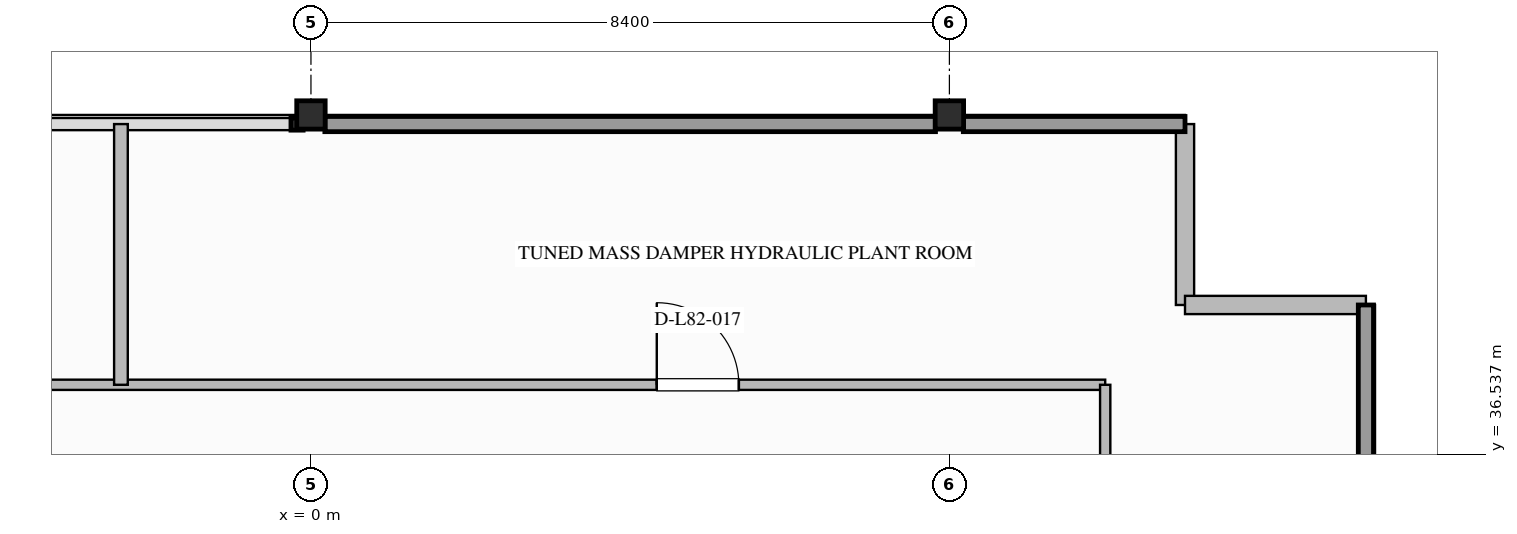
"""IFC4 building model, lengths in metres.
Left out: names, types, materials, properties, quantities, classifications, styles, units other than length and angle.
Written with IfcOpenShell. Run it as: python <this file> out.ifc"""

import sys

from ifc_helpers import new_model, si_unit, direction, frame, frame_2d, origin, origin_2d, place, context, subcontext, project, spatial, rectangle, i_section, extrude, element, fill, save


model = new_model("IFC4")
c1 = context("Model", 3, precision=1e-05, world=origin(), true_north=direction((0.0, 1.0)))
c2 = subcontext(c1, "Body", "Model", "MODEL_VIEW")
j1 = project(units=[si_unit("LENGTHUNIT", "METRE"), si_unit("PLANEANGLEUNIT", "RADIAN")], contexts=[c1])
p1 = place(None, origin())
s1 = spatial("IfcSite", under=j1, at=p1, CompositionType="ELEMENT")
p2 = place(p1, origin())
s2 = spatial("IfcBuilding", under=s1, at=p2, CompositionType="ELEMENT")
p3 = place(p2, frame((0.0, 0.0, 315.4)))
s3 = spatial("IfcBuildingStorey", under=s2, at=p3, CompositionType="ELEMENT", Elevation=315.4)
for number, where, z_axis, x_axis in (
    (1, (0.0, 41.0, 0.0), (0.0, 0.0, 1.0), (1.0, 0.0, 0.0)),
    (2, (8.4, 41.0, 0.0), (0.0, 0.0, 1.0), (1.0, 0.0, 0.0)),
):
    element("IfcColumn", number, at=place(p3, frame(where, z_axis=z_axis, x_axis=x_axis)), inside=s3, PredefinedType="COLUMN", context=c2, shape_type="SweptSolid", body=[
        extrude(i_section(OverallWidth=0.374, OverallDepth=0.372, WebThickness=0.016, FlangeThickness=0.026, FilletRadius=0.025, at=origin_2d()), origin(), (0.0, 0.0, 1.0), 3.997),
    ])
for number, where, z_axis, x_axis in (
    (3, (11.5, 40.88, 0.0), (0.0, 0.0, 1.0), (0.0, -1.0, 0.0)),
    (4, (11.5, 38.5, 0.0), (0.0, 0.0, 1.0), (1.0, 0.0, 0.0)),
):
    element("IfcWall", number, at=place(p3, frame(where, z_axis=z_axis, x_axis=x_axis)), inside=s3, PredefinedType="STANDARD", context=c2, shape_type="SweptSolid", body=[
        extrude(rectangle(XDim=2.38, YDim=0.24, at=frame_2d((1.19, 0.0))), origin(), (0.0, 0.0, 1.0), 3.68),
    ])
p4 = place(p3, frame((-10.45, 37.45, 0.0), z_axis=(0.0, 0.0, 1.0), x_axis=(1.0, 0.0, 0.0)))
e5 = element("IfcWall", 5, at=p4, inside=s3, PredefinedType="PARTITIONING", context=c2, shape_type="SweptSolid", body=[
    extrude(rectangle(XDim=20.9, YDim=0.135, at=frame_2d((10.45, 0.0))), origin(), (0.0, 0.0, 1.0), 3.68),
])
p5 = place(p4, frame((3.0, 0.0, 0.0)))
e6 = element("IfcOpeningElement", 6, at=p5, cuts=e5, PredefinedType="OPENING", context=c2, shape_type="SweptSolid", body=[
    extrude(rectangle(XDim=1.08, YDim=2.04, at=frame_2d((0.54, 1.02))), frame((0.0, 0.077, 0.0), z_axis=(0.0, -1.0, 0.0), x_axis=(1.0, 0.0, 0.0)), (0.0, 0.0, 1.0), 0.155),
])
p6 = place(p4, frame((15.0, 0.0, 0.0)))
e7 = element("IfcOpeningElement", 7, at=p6, cuts=e5, PredefinedType="OPENING", context=c2, shape_type="SweptSolid", body=[
    extrude(rectangle(XDim=1.08, YDim=2.04, at=frame_2d((0.54, 1.02))), frame((0.0, 0.077, 0.0), z_axis=(0.0, -1.0, 0.0), x_axis=(1.0, 0.0, 0.0)), (0.0, 0.0, 1.0), 0.155),
])
p7 = place(p3, frame((10.45, 16.55, 0.0), z_axis=(0.0, 0.0, 1.0), x_axis=(0.0, 1.0, 0.0)))
e8 = element("IfcWall", 8, at=p7, inside=s3, PredefinedType="PARTITIONING", context=c2, shape_type="SweptSolid", body=[
    extrude(rectangle(XDim=20.9, YDim=0.135, at=frame_2d((10.45, 0.0))), origin(), (0.0, 0.0, 1.0), 3.68),
])
p8 = place(p7, frame((8.0, 0.0, 0.0)))
e9 = element("IfcOpeningElement", 9, at=p8, cuts=e8, PredefinedType="OPENING", context=c2, shape_type="SweptSolid", body=[
    extrude(rectangle(XDim=1.08, YDim=2.04, at=frame_2d((0.54, 1.02))), frame((0.0, 0.077, 0.0), z_axis=(0.0, -1.0, 0.0), x_axis=(1.0, 0.0, 0.0)), (0.0, 0.0, 1.0), 0.155),
])
p9 = place(p3, frame((-2.5, 37.45, 0.0), z_axis=(0.0, 0.0, 1.0), x_axis=(0.0, 1.0, 0.0)))
e10 = element("IfcWall", 10, at=p9, inside=s3, PredefinedType="SOLIDWALL", context=c2, shape_type="SweptSolid", body=[
    extrude(rectangle(XDim=3.43, YDim=0.18, at=frame_2d((1.715, 0.0))), origin(), (0.0, 0.0, 1.0), 3.68),
])
p10 = place(p6, origin())
e11 = element("IfcDoor", 11, at=p10, inside=s3, OperationType="SINGLE_SWING_LEFT", PredefinedType="DOOR", context=c2, shape_type="SweptSolid", body=[
    extrude(rectangle(XDim=1.08, YDim=2.04, at=frame_2d((0.54, 1.02))), frame((0.0, 0.025, 0.0), z_axis=(0.0, -1.0, 0.0), x_axis=(1.0, 0.0, 0.0)), (0.0, 0.0, 1.0), 0.05),
])
fill(e7, e11)
save(model, sys.argv[1])
